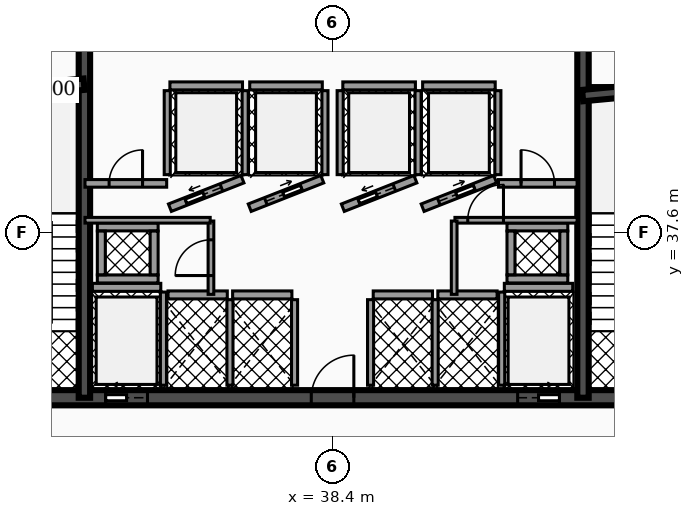
"""IFC4 building model, lengths in metres.
Left out: names, types, materials, properties, quantities, classifications, styles, units other than length and angle.
Written with IfcOpenShell. Run it as: python <this file> out.ifc"""

import sys

from ifc_helpers import new_model, si_unit, direction, frame, frame_2d, origin, place, context, subcontext, project, spatial, rectangle, extrude, element, fill, save


model = new_model("IFC4")
c1 = context("Model", 3, precision=1e-05, world=origin(), true_north=direction((0.0, 1.0)))
c2 = subcontext(c1, "Body", "Model", "MODEL_VIEW")
j1 = project(units=[si_unit("LENGTHUNIT", "METRE"), si_unit("PLANEANGLEUNIT", "RADIAN")], contexts=[c1])
p1 = place(None, origin())
s1 = spatial("IfcSite", under=j1, at=p1, CompositionType="ELEMENT")
p2 = place(p1, origin())
s2 = spatial("IfcBuilding", under=s1, at=p2, CompositionType="ELEMENT")
p3 = place(p2, frame((0.0, 0.0, 43.86)))
s3 = spatial("IfcBuildingStorey", under=s2, at=p3, CompositionType="ELEMENT", Elevation=43.86)
p4 = place(p3, frame((28.4, 33.25, 0.0), z_axis=(0.0, 0.0, 1.0), x_axis=(1.0, 0.0, 0.0)))
e1 = element("IfcWall", 1, at=p4, inside=s3, PredefinedType="SHEAR", context=c2, shape_type="SweptSolid", body=[
    extrude(rectangle(XDim=20.06, YDim=0.4, at=frame_2d((10.03, 0.0))), origin(), (0.0, 0.0, 1.0), 3.82),
])
p5 = place(p4, frame((4.03, 0.0, 0.0)))
e2 = element("IfcOpeningElement", 2, at=p5, cuts=e1, PredefinedType="OPENING", context=c2, shape_type="SweptSolid", body=[
    extrude(rectangle(XDim=1.1, YDim=2.15, at=frame_2d((0.55, 1.075))), frame((0.0, 0.21, 0.0), z_axis=(0.0, -1.0, 0.0), x_axis=(1.0, 0.0, 0.0)), (0.0, 0.0, 1.0), 0.42),
])
p6 = place(p4, frame((14.87, 0.0, 0.0)))
e3 = element("IfcOpeningElement", 3, at=p6, cuts=e1, PredefinedType="OPENING", context=c2, shape_type="SweptSolid", body=[
    extrude(rectangle(XDim=1.1, YDim=2.15, at=frame_2d((0.55, 1.075))), frame((0.0, 0.21, 0.0), z_axis=(0.0, -1.0, 0.0), x_axis=(1.0, 0.0, 0.0)), (0.0, 0.0, 1.0), 0.42),
])
p7 = place(p4, frame((1.31, 0.0, 0.0)))
e4 = element("IfcOpeningElement", 4, at=p7, cuts=e1, PredefinedType="OPENING", context=c2, shape_type="SweptSolid", body=[
    extrude(rectangle(XDim=1.1, YDim=2.2, at=frame_2d((0.55, 1.1))), frame((0.0, 0.21, 0.0), z_axis=(0.0, -1.0, 0.0), x_axis=(1.0, 0.0, 0.0)), (0.0, 0.0, 1.0), 0.42),
])
p8 = place(p4, frame((9.44, 0.0, 0.0)))
e5 = element("IfcOpeningElement", 5, at=p8, cuts=e1, PredefinedType="OPENING", context=c2, shape_type="SweptSolid", body=[
    extrude(rectangle(XDim=1.12, YDim=2.05, at=frame_2d((0.56, 1.025))), frame((0.0, 0.21, 0.0), z_axis=(0.0, -1.0, 0.0), x_axis=(1.0, 0.0, 0.0)), (0.0, 0.0, 1.0), 0.42),
])
p9 = place(p4, frame((17.65, 0.0, 0.0)))
e6 = element("IfcOpeningElement", 6, at=p9, cuts=e1, PredefinedType="OPENING", context=c2, shape_type="SweptSolid", body=[
    extrude(rectangle(XDim=1.1, YDim=2.2, at=frame_2d((0.55, 1.1))), frame((0.0, 0.21, 0.0), z_axis=(0.0, -1.0, 0.0), x_axis=(1.0, 0.0, 0.0)), (0.0, 0.0, 1.0), 0.42),
])
for number, where, z_axis, x_axis in (
    (7, (31.87, 33.25, 0.0), (0.0, 0.0, 1.0), (0.0, 1.0, 0.0)),
    (8, (44.99, 33.25, 0.0), (0.0, 0.0, 1.0), (0.0, 1.0, 0.0)),
):
    element("IfcWall", number, at=place(p3, frame(where, z_axis=z_axis, x_axis=x_axis)), inside=s3, PredefinedType="SHEAR", context=c2, shape_type="SweptSolid", body=[
        extrude(rectangle(XDim=10.2, YDim=0.3, at=frame_2d((5.1, 0.0))), origin(), (0.0, 0.0, 1.0), 3.82),
    ])
p10 = place(p3, frame((28.64, 41.2, 0.0), z_axis=(0.0, 0.0, 1.0), x_axis=(0.995687118776, 0.092774789157, 0.0)))
e9 = element("IfcWall", 9, at=p10, inside=s3, PredefinedType="SHEAR", context=c2, shape_type="SweptSolid", body=[
    extrude(rectangle(XDim=3.234, YDim=0.3, at=frame_2d((1.617, 0.0))), origin(), (0.0, 0.0, 1.0), 3.82),
])
p11 = place(p3, frame((44.98, 41.2, 0.0), z_axis=(0.0, 0.0, 1.0), x_axis=(0.995686468965, 0.09278176286, 0.0)))
e10 = element("IfcWall", 10, at=p11, inside=s3, PredefinedType="SHEAR", context=c2, shape_type="SweptSolid", body=[
    extrude(rectangle(XDim=3.234, YDim=0.3, at=frame_2d((1.617, 0.0))), origin(), (0.0, 0.0, 1.0), 3.82),
])
p12 = place(p3, frame((32.08, 36.155, 0.0), z_axis=(0.0, 0.0, 1.0), x_axis=(1.0, 0.0, 0.0)))
e11 = element("IfcWall", 11, at=p12, inside=s3, PredefinedType="SOLIDWALL", context=c2, shape_type="SweptSolid", body=[
    extrude(rectangle(XDim=1.8, YDim=0.21, at=frame_2d((0.9, 0.0))), origin(), (0.0, 0.0, 1.0), 2.792),
])
p13 = place(p3, frame((33.95, 33.58, 0.0), z_axis=(0.0, 0.0, 1.0), x_axis=(0.0, 1.0, 0.0)))
e12 = element("IfcWall", 12, at=p13, inside=s3, PredefinedType="SOLIDWALL", context=c2, shape_type="SweptSolid", body=[
    extrude(rectangle(XDim=2.45, YDim=0.16, at=frame_2d((1.225, 0.0))), origin(), (0.0, 0.0, 1.0), 2.792),
])
p14 = place(p3, frame((42.92, 36.155, 0.0), z_axis=(0.0, 0.0, 1.0), x_axis=(1.0, 0.0, 0.0)))
e13 = element("IfcWall", 13, at=p14, inside=s3, PredefinedType="SOLIDWALL", context=c2, shape_type="SweptSolid", body=[
    extrude(rectangle(XDim=1.8, YDim=0.21, at=frame_2d((0.9, 0.0))), origin(), (0.0, 0.0, 1.0), 2.792),
])
p15 = place(p3, frame((42.85, 33.58, 0.0), z_axis=(0.0, 0.0, 1.0), x_axis=(0.0, 1.0, 0.0)))
e14 = element("IfcWall", 14, at=p15, inside=s3, PredefinedType="SOLIDWALL", context=c2, shape_type="SweptSolid", body=[
    extrude(rectangle(XDim=2.45, YDim=0.16, at=frame_2d((1.225, 0.0))), origin(), (0.0, 0.0, 1.0), 2.792),
])
p16 = place(p3, frame((34.12, 38.25, 0.0), z_axis=(0.0, 0.0, 1.0), x_axis=(0.930804993012, 0.36551616241, 0.0)))
e15 = element("IfcWall", 15, at=p16, inside=s3, PredefinedType="SOLIDWALL", context=c2, shape_type="SweptSolid", body=[
    extrude(rectangle(XDim=2.052, YDim=0.21, at=frame_2d((1.026, 0.0))), origin(), (0.0, 0.0, 1.0), 2.792),
])
p17 = place(p16, frame((0.455, 0.0, 0.0)))
e16 = element("IfcOpeningElement", 16, at=p17, cuts=e15, PredefinedType="OPENING", context=c2, shape_type="SweptSolid", body=[
    extrude(rectangle(XDim=1.0, YDim=2.1, at=frame_2d((0.5, 1.05))), frame((0.0, 0.115, 0.0), z_axis=(0.0, -1.0, 0.0), x_axis=(1.0, 0.0, 0.0)), (0.0, 0.0, 1.0), 0.23),
])
p18 = place(p3, frame((34.12, 41.455, 0.0), z_axis=(0.0, 0.0, 1.0), x_axis=(1.0, 0.0, 0.0)))
e17 = element("IfcWall", 17, at=p18, inside=s3, PredefinedType="SOLIDWALL", context=c2, shape_type="SweptSolid", body=[
    extrude(rectangle(XDim=1.91, YDim=0.21, at=frame_2d((0.955, 0.0))), origin(), (0.0, 0.0, 1.0), 2.792),
])
for number, where, z_axis, x_axis in (
    (18, (34.05, 39.12, 0.0), (0.0, 0.0, 1.0), (0.0, 1.0, 0.0)),
    (19, (36.1, 39.12, 0.0), (0.0, 0.0, 1.0), (0.0, 1.0, 0.0)),
):
    element("IfcWall", number, at=place(p3, frame(where, z_axis=z_axis, x_axis=x_axis)), inside=s3, PredefinedType="SOLIDWALL", context=c2, shape_type="SweptSolid", body=[
        extrude(rectangle(XDim=2.21, YDim=0.16, at=frame_2d((1.105, 0.0))), origin(), (0.0, 0.0, 1.0), 2.792),
    ])
p19 = place(p3, frame((36.22, 38.25, 0.0), z_axis=(0.0, 0.0, 1.0), x_axis=(0.930804993012, 0.36551616241, 0.0)))
e20 = element("IfcWall", 20, at=p19, inside=s3, PredefinedType="SOLIDWALL", context=c2, shape_type="SweptSolid", body=[
    extrude(rectangle(XDim=2.052, YDim=0.21, at=frame_2d((1.026, 0.0))), origin(), (0.0, 0.0, 1.0), 2.792),
])
p20 = place(p19, frame((0.455, 0.0, 0.0)))
e21 = element("IfcOpeningElement", 21, at=p20, cuts=e20, PredefinedType="OPENING", context=c2, shape_type="SweptSolid", body=[
    extrude(rectangle(XDim=1.0, YDim=2.1, at=frame_2d((0.5, 1.05))), frame((0.0, 0.115, 0.0), z_axis=(0.0, -1.0, 0.0), x_axis=(1.0, 0.0, 0.0)), (0.0, 0.0, 1.0), 0.23),
])
p21 = place(p3, frame((36.22, 41.455, 0.0), z_axis=(0.0, 0.0, 1.0), x_axis=(1.0, 0.0, 0.0)))
e22 = element("IfcWall", 22, at=p21, inside=s3, PredefinedType="SOLIDWALL", context=c2, shape_type="SweptSolid", body=[
    extrude(rectangle(XDim=1.91, YDim=0.21, at=frame_2d((0.955, 0.0))), origin(), (0.0, 0.0, 1.0), 2.792),
])
p22 = place(p3, frame((38.2, 39.12, 0.0), z_axis=(0.0, 0.0, 1.0), x_axis=(0.0, 1.0, 0.0)))
e23 = element("IfcWall", 23, at=p22, inside=s3, PredefinedType="SOLIDWALL", context=c2, shape_type="SweptSolid", body=[
    extrude(rectangle(XDim=2.21, YDim=0.16, at=frame_2d((1.105, 0.0))), origin(), (0.0, 0.0, 1.0), 2.792),
])
p23 = place(p3, frame((38.67, 38.25, 0.0), z_axis=(0.0, 0.0, 1.0), x_axis=(0.930820886763, 0.3654756856, 0.0)))
e24 = element("IfcWall", 24, at=p23, inside=s3, PredefinedType="SOLIDWALL", context=c2, shape_type="SweptSolid", body=[
    extrude(rectangle(XDim=2.052, YDim=0.21, at=frame_2d((1.026, 0.0))), origin(), (0.0, 0.0, 1.0), 2.792),
])
p24 = place(p23, frame((0.455, 0.0, 0.0)))
e25 = element("IfcOpeningElement", 25, at=p24, cuts=e24, PredefinedType="OPENING", context=c2, shape_type="SweptSolid", body=[
    extrude(rectangle(XDim=1.0, YDim=2.1, at=frame_2d((0.5, 1.05))), frame((0.0, 0.115, 0.0), z_axis=(0.0, -1.0, 0.0), x_axis=(1.0, 0.0, 0.0)), (0.0, 0.0, 1.0), 0.23),
])
p25 = place(p3, frame((38.67, 41.455, 0.0), z_axis=(0.0, 0.0, 1.0), x_axis=(1.0, 0.0, 0.0)))
e26 = element("IfcWall", 26, at=p25, inside=s3, PredefinedType="SOLIDWALL", context=c2, shape_type="SweptSolid", body=[
    extrude(rectangle(XDim=1.91, YDim=0.21, at=frame_2d((0.955, 0.0))), origin(), (0.0, 0.0, 1.0), 2.792),
])
for number, where, z_axis, x_axis in (
    (27, (38.6, 39.12, 0.0), (0.0, 0.0, 1.0), (0.0, 1.0, 0.0)),
    (28, (40.65, 39.12, 0.0), (0.0, 0.0, 1.0), (0.0, 1.0, 0.0)),
):
    element("IfcWall", number, at=place(p3, frame(where, z_axis=z_axis, x_axis=x_axis)), inside=s3, PredefinedType="SOLIDWALL", context=c2, shape_type="SweptSolid", body=[
        extrude(rectangle(XDim=2.21, YDim=0.16, at=frame_2d((1.105, 0.0))), origin(), (0.0, 0.0, 1.0), 2.792),
    ])
p26 = place(p3, frame((40.77, 38.25, 0.0), z_axis=(0.0, 0.0, 1.0), x_axis=(0.930804993012, 0.36551616241, 0.0)))
e29 = element("IfcWall", 29, at=p26, inside=s3, PredefinedType="SOLIDWALL", context=c2, shape_type="SweptSolid", body=[
    extrude(rectangle(XDim=2.052, YDim=0.21, at=frame_2d((1.026, 0.0))), origin(), (0.0, 0.0, 1.0), 2.792),
])
p27 = place(p26, frame((0.455, 0.0, 0.0)))
e30 = element("IfcOpeningElement", 30, at=p27, cuts=e29, PredefinedType="OPENING", context=c2, shape_type="SweptSolid", body=[
    extrude(rectangle(XDim=1.0, YDim=2.1, at=frame_2d((0.5, 1.05))), frame((0.0, 0.115, 0.0), z_axis=(0.0, -1.0, 0.0), x_axis=(1.0, 0.0, 0.0)), (0.0, 0.0, 1.0), 0.23),
])
p28 = place(p3, frame((40.77, 41.455, 0.0), z_axis=(0.0, 0.0, 1.0), x_axis=(1.0, 0.0, 0.0)))
e31 = element("IfcWall", 31, at=p28, inside=s3, PredefinedType="SOLIDWALL", context=c2, shape_type="SweptSolid", body=[
    extrude(rectangle(XDim=1.91, YDim=0.21, at=frame_2d((0.955, 0.0))), origin(), (0.0, 0.0, 1.0), 2.792),
])
p29 = place(p3, frame((42.75, 39.12, 0.0), z_axis=(0.0, 0.0, 1.0), x_axis=(0.0, 1.0, 0.0)))
e32 = element("IfcWall", 32, at=p29, inside=s3, PredefinedType="SOLIDWALL", context=c2, shape_type="SweptSolid", body=[
    extrude(rectangle(XDim=2.21, YDim=0.16, at=frame_2d((1.105, 0.0))), origin(), (0.0, 0.0, 1.0), 2.792),
])
p30 = place(p3, frame((34.07, 35.955, 0.0), z_axis=(0.0, 0.0, 1.0), x_axis=(1.0, 0.0, 0.0)))
e33 = element("IfcWall", 33, at=p30, inside=s3, PredefinedType="SOLIDWALL", context=c2, shape_type="SweptSolid", body=[
    extrude(rectangle(XDim=1.56, YDim=0.21, at=frame_2d((0.78, 0.0))), origin(), (0.0, 0.0, 1.0), 2.792),
])
p31 = place(p3, frame((35.7, 33.58, 0.0), z_axis=(0.0, 0.0, 1.0), x_axis=(0.0, 1.0, 0.0)))
e34 = element("IfcWall", 34, at=p31, inside=s3, PredefinedType="SOLIDWALL", context=c2, shape_type="SweptSolid", body=[
    extrude(rectangle(XDim=2.25, YDim=0.16, at=frame_2d((1.125, 0.0))), origin(), (0.0, 0.0, 1.0), 2.792),
])
p32 = place(p3, frame((35.77, 35.955, 0.0), z_axis=(0.0, 0.0, 1.0), x_axis=(1.0, 0.0, 0.0)))
e35 = element("IfcWall", 35, at=p32, inside=s3, PredefinedType="SOLIDWALL", context=c2, shape_type="SweptSolid", body=[
    extrude(rectangle(XDim=1.56, YDim=0.21, at=frame_2d((0.78, 0.0))), origin(), (0.0, 0.0, 1.0), 2.792),
])
p33 = place(p3, frame((37.4, 33.58, 0.0), z_axis=(0.0, 0.0, 1.0), x_axis=(0.0, 1.0, 0.0)))
e36 = element("IfcWall", 36, at=p33, inside=s3, PredefinedType="SOLIDWALL", context=c2, shape_type="SweptSolid", body=[
    extrude(rectangle(XDim=2.25, YDim=0.16, at=frame_2d((1.125, 0.0))), origin(), (0.0, 0.0, 1.0), 2.792),
])
p34 = place(p3, frame((39.47, 35.955, 0.0), z_axis=(0.0, 0.0, 1.0), x_axis=(1.0, 0.0, 0.0)))
e37 = element("IfcWall", 37, at=p34, inside=s3, PredefinedType="SOLIDWALL", context=c2, shape_type="SweptSolid", body=[
    extrude(rectangle(XDim=1.56, YDim=0.21, at=frame_2d((0.78, 0.0))), origin(), (0.0, 0.0, 1.0), 2.792),
])
for number, where, z_axis, x_axis in (
    (38, (39.4, 33.58, 0.0), (0.0, 0.0, 1.0), (0.0, 1.0, 0.0)),
    (39, (41.1, 33.58, 0.0), (0.0, 0.0, 1.0), (0.0, 1.0, 0.0)),
):
    element("IfcWall", number, at=place(p3, frame(where, z_axis=z_axis, x_axis=x_axis)), inside=s3, PredefinedType="SOLIDWALL", context=c2, shape_type="SweptSolid", body=[
        extrude(rectangle(XDim=2.25, YDim=0.16, at=frame_2d((1.125, 0.0))), origin(), (0.0, 0.0, 1.0), 2.792),
    ])
p35 = place(p3, frame((41.17, 35.955, 0.0), z_axis=(0.0, 0.0, 1.0), x_axis=(1.0, 0.0, 0.0)))
e40 = element("IfcWall", 40, at=p35, inside=s3, PredefinedType="SOLIDWALL", context=c2, shape_type="SweptSolid", body=[
    extrude(rectangle(XDim=1.56, YDim=0.21, at=frame_2d((0.78, 0.0))), origin(), (0.0, 0.0, 1.0), 2.792),
])
for number, where, z_axis, x_axis in (
    (41, (32.21, 36.375, 0.0), (0.0, 0.0, 1.0), (1.0, 0.0, 0.0)),
    (42, (32.21, 37.745, 0.0), (0.0, 0.0, 1.0), (1.0, 0.0, 0.0)),
):
    element("IfcWall", number, at=place(p3, frame(where, z_axis=z_axis, x_axis=x_axis)), inside=s3, PredefinedType="SOLIDWALL", context=c2, shape_type="SweptSolid", body=[
        extrude(rectangle(XDim=1.6, YDim=0.21, at=frame_2d((0.8, 0.0))), origin(), (0.0, 0.0, 1.0), 3.82),
    ])
for number, where, z_axis, x_axis in (
    (43, (32.315, 36.485, 0.0), (0.0, 0.0, 1.0), (0.0, 1.0, 0.0)),
    (44, (33.705, 36.485, 0.0), (0.0, 0.0, 1.0), (0.0, 1.0, 0.0)),
):
    element("IfcWall", number, at=place(p3, frame(where, z_axis=z_axis, x_axis=x_axis)), inside=s3, PredefinedType="SOLIDWALL", context=c2, shape_type="SweptSolid", body=[
        extrude(rectangle(XDim=1.15, YDim=0.21, at=frame_2d((0.575, 0.0))), origin(), (0.0, 0.0, 1.0), 3.82),
    ])
for number, where, z_axis, x_axis in (
    (45, (42.99, 36.375, 0.0), (0.0, 0.0, 1.0), (1.0, 0.0, 0.0)),
    (46, (42.99, 37.745, 0.0), (0.0, 0.0, 1.0), (1.0, 0.0, 0.0)),
):
    element("IfcWall", number, at=place(p3, frame(where, z_axis=z_axis, x_axis=x_axis)), inside=s3, PredefinedType="SOLIDWALL", context=c2, shape_type="SweptSolid", body=[
        extrude(rectangle(XDim=1.6, YDim=0.21, at=frame_2d((0.8, 0.0))), origin(), (0.0, 0.0, 1.0), 3.82),
    ])
for number, where, z_axis, x_axis in (
    (47, (43.095, 36.485, 0.0), (0.0, 0.0, 1.0), (0.0, 1.0, 0.0)),
    (48, (44.485, 36.485, 0.0), (0.0, 0.0, 1.0), (0.0, 1.0, 0.0)),
):
    element("IfcWall", number, at=place(p3, frame(where, z_axis=z_axis, x_axis=x_axis)), inside=s3, PredefinedType="SOLIDWALL", context=c2, shape_type="SweptSolid", body=[
        extrude(rectangle(XDim=1.15, YDim=0.21, at=frame_2d((0.575, 0.0))), origin(), (0.0, 0.0, 1.0), 3.82),
    ])
p36 = place(p3, frame((35.2, 35.97, 0.0), z_axis=(0.0, 0.0, 1.0), x_axis=(0.0, 1.0, 0.0)))
e49 = element("IfcWall", 49, at=p36, inside=s3, PredefinedType="PARTITIONING", context=c2, shape_type="SweptSolid", body=[
    extrude(rectangle(XDim=1.93, YDim=0.15, at=frame_2d((0.965, 0.0))), origin(), (0.0, 0.0, 1.0), 2.777),
])
p37 = place(p36, frame((0.495, 0.0, 0.0)))
e50 = element("IfcOpeningElement", 50, at=p37, cuts=e49, PredefinedType="OPENING", context=c2, shape_type="SweptSolid", body=[
    extrude(rectangle(XDim=0.94, YDim=2.05, at=frame_2d((0.47, 1.025))), frame((0.0, 0.085, 0.0), z_axis=(0.0, -1.0, 0.0), x_axis=(1.0, 0.0, 0.0)), (0.0, 0.0, 1.0), 0.17),
])
p38 = place(p3, frame((31.885, 37.92, 0.0), z_axis=(0.0, 0.0, 1.0), x_axis=(1.0, 0.0, 0.0)))
e51 = element("IfcWall", 51, at=p38, inside=s3, PredefinedType="PARTITIONING", context=c2, shape_type="SweptSolid", body=[
    extrude(rectangle(XDim=3.295, YDim=0.15, at=frame_2d((1.647, 0.0))), origin(), (0.0, 0.0, 1.0), 2.777),
])
p39 = place(p3, frame((31.885, 38.89, 0.0), z_axis=(0.0, 0.0, 1.0), x_axis=(1.0, 0.0, 0.0)))
e52 = element("IfcWall", 52, at=p39, inside=s3, PredefinedType="PARTITIONING", context=c2, shape_type="SweptSolid", body=[
    extrude(rectangle(XDim=2.15, YDim=0.2, at=frame_2d((1.075, 0.0))), origin(), (0.0, 0.0, 1.0), 2.777),
])
p40 = place(p39, frame((0.635, 0.0, 0.0)))
e53 = element("IfcOpeningElement", 53, at=p40, cuts=e52, PredefinedType="OPENING", context=c2, shape_type="SweptSolid", body=[
    extrude(rectangle(XDim=0.88, YDim=2.05, at=frame_2d((0.44, 1.025))), frame((0.0, 0.11, 0.0), z_axis=(0.0, -1.0, 0.0), x_axis=(1.0, 0.0, 0.0)), (0.0, 0.0, 1.0), 0.22),
])
p41 = place(p3, frame((42.765, 38.89, 0.0), z_axis=(0.0, 0.0, 1.0), x_axis=(1.0, 0.0, 0.0)))
e54 = element("IfcWall", 54, at=p41, inside=s3, PredefinedType="PARTITIONING", context=c2, shape_type="SweptSolid", body=[
    extrude(rectangle(XDim=2.07, YDim=0.2, at=frame_2d((1.035, 0.0))), origin(), (0.0, 0.0, 1.0), 2.777),
])
p42 = place(p41, frame((0.595, 0.0, 0.0)))
e55 = element("IfcOpeningElement", 55, at=p42, cuts=e54, PredefinedType="OPENING", context=c2, shape_type="SweptSolid", body=[
    extrude(rectangle(XDim=0.88, YDim=2.05, at=frame_2d((0.44, 1.025))), frame((0.0, 0.11, 0.0), z_axis=(0.0, -1.0, 0.0), x_axis=(1.0, 0.0, 0.0)), (0.0, 0.0, 1.0), 0.22),
])
p43 = place(p3, frame((41.62, 37.92, 0.0), z_axis=(0.0, 0.0, 1.0), x_axis=(1.0, 0.0, 0.0)))
e56 = element("IfcWall", 56, at=p43, inside=s3, PredefinedType="PARTITIONING", context=c2, shape_type="SweptSolid", body=[
    extrude(rectangle(XDim=3.215, YDim=0.15, at=frame_2d((1.607, 0.0))), origin(), (0.0, 0.0, 1.0), 2.777),
])
p44 = place(p43, frame((0.337, 0.0, 0.0)))
e57 = element("IfcOpeningElement", 57, at=p44, cuts=e56, PredefinedType="OPENING", context=c2, shape_type="SweptSolid", body=[
    extrude(rectangle(XDim=0.94, YDim=2.05, at=frame_2d((0.47, 1.025))), frame((0.0, 0.085, 0.0), z_axis=(0.0, -1.0, 0.0), x_axis=(1.0, 0.0, 0.0)), (0.0, 0.0, 1.0), 0.17),
])
p45 = place(p3, frame((41.6, 35.97, 0.0), z_axis=(0.0, 0.0, 1.0), x_axis=(0.0, 1.0, 0.0)))
e58 = element("IfcWall", 58, at=p45, inside=s3, PredefinedType="PARTITIONING", context=c2, shape_type="SweptSolid", body=[
    extrude(rectangle(XDim=1.93, YDim=0.15, at=frame_2d((0.965, 0.0))), origin(), (0.0, 0.0, 1.0), 2.777),
])
p46 = place(p5, origin())
e59 = element("IfcDoor", 59, at=p46, inside=s3, OperationType="SLIDING_TO_LEFT", PredefinedType="DOOR", context=c2, shape_type="SweptSolid", body=[
    extrude(rectangle(XDim=1.1, YDim=2.15, at=frame_2d((0.55, 1.075))), frame((0.0, 0.025, 0.0), z_axis=(0.0, -1.0, 0.0), x_axis=(1.0, 0.0, 0.0)), (0.0, 0.0, 1.0), 0.05),
])
fill(e2, e59)
p47 = place(p6, origin())
e60 = element("IfcDoor", 60, at=p47, inside=s3, OperationType="SLIDING_TO_RIGHT", PredefinedType="DOOR", context=c2, shape_type="SweptSolid", body=[
    extrude(rectangle(XDim=1.1, YDim=2.15, at=frame_2d((0.55, 1.075))), frame((0.0, 0.025, 0.0), z_axis=(0.0, -1.0, 0.0), x_axis=(1.0, 0.0, 0.0)), (0.0, 0.0, 1.0), 0.05),
])
fill(e3, e60)
p48 = place(p17, origin())
e61 = element("IfcDoor", 61, at=p48, inside=s3, OperationType="SLIDING_TO_LEFT", PredefinedType="DOOR", context=c2, shape_type="SweptSolid", body=[
    extrude(rectangle(XDim=1.0, YDim=2.1, at=frame_2d((0.5, 1.05))), frame((0.0, 0.025, 0.0), z_axis=(0.0, -1.0, 0.0), x_axis=(1.0, 0.0, 0.0)), (0.0, 0.0, 1.0), 0.05),
])
fill(e16, e61)
p49 = place(p20, origin())
e62 = element("IfcDoor", 62, at=p49, inside=s3, OperationType="SLIDING_TO_RIGHT", PredefinedType="DOOR", context=c2, shape_type="SweptSolid", body=[
    extrude(rectangle(XDim=1.0, YDim=2.1, at=frame_2d((0.5, 1.05))), frame((0.0, 0.025, 0.0), z_axis=(0.0, -1.0, 0.0), x_axis=(1.0, 0.0, 0.0)), (0.0, 0.0, 1.0), 0.05),
])
fill(e21, e62)
p50 = place(p24, origin())
e63 = element("IfcDoor", 63, at=p50, inside=s3, OperationType="SLIDING_TO_LEFT", PredefinedType="DOOR", context=c2, shape_type="SweptSolid", body=[
    extrude(rectangle(XDim=1.0, YDim=2.1, at=frame_2d((0.5, 1.05))), frame((0.0, 0.025, 0.0), z_axis=(0.0, -1.0, 0.0), x_axis=(1.0, 0.0, 0.0)), (0.0, 0.0, 1.0), 0.05),
])
fill(e25, e63)
p51 = place(p27, origin())
e64 = element("IfcDoor", 64, at=p51, inside=s3, OperationType="SLIDING_TO_RIGHT", PredefinedType="DOOR", context=c2, shape_type="SweptSolid", body=[
    extrude(rectangle(XDim=1.0, YDim=2.1, at=frame_2d((0.5, 1.05))), frame((0.0, 0.025, 0.0), z_axis=(0.0, -1.0, 0.0), x_axis=(1.0, 0.0, 0.0)), (0.0, 0.0, 1.0), 0.05),
])
fill(e30, e64)
p52 = place(p8, origin())
e65 = element("IfcDoor", 65, at=p52, inside=s3, OperationType="SINGLE_SWING_RIGHT", PredefinedType="DOOR", context=c2, shape_type="SweptSolid", body=[
    extrude(rectangle(XDim=1.12, YDim=2.05, at=frame_2d((0.56, 1.025))), frame((0.0, 0.025, 0.0), z_axis=(0.0, -1.0, 0.0), x_axis=(1.0, 0.0, 0.0)), (0.0, 0.0, 1.0), 0.05),
])
fill(e5, e65)
p53 = place(p37, origin())
e66 = element("IfcDoor", 66, at=p53, inside=s3, OperationType="SINGLE_SWING_LEFT", PredefinedType="DOOR", context=c2, shape_type="SweptSolid", body=[
    extrude(rectangle(XDim=0.94, YDim=2.05, at=frame_2d((0.47, 1.025))), frame((0.0, 0.025, 0.0), z_axis=(0.0, -1.0, 0.0), x_axis=(1.0, 0.0, 0.0)), (0.0, 0.0, 1.0), 0.05),
])
fill(e50, e66)
p54 = place(p40, origin())
e67 = element("IfcDoor", 67, at=p54, inside=s3, OperationType="SINGLE_SWING_RIGHT", PredefinedType="DOOR", context=c2, shape_type="SweptSolid", body=[
    extrude(rectangle(XDim=0.88, YDim=2.05, at=frame_2d((0.44, 1.025))), frame((0.0, 0.025, 0.0), z_axis=(0.0, -1.0, 0.0), x_axis=(1.0, 0.0, 0.0)), (0.0, 0.0, 1.0), 0.05),
])
fill(e53, e67)
p55 = place(p42, origin())
e68 = element("IfcDoor", 68, at=p55, inside=s3, OperationType="SINGLE_SWING_LEFT", PredefinedType="DOOR", context=c2, shape_type="SweptSolid", body=[
    extrude(rectangle(XDim=0.88, YDim=2.05, at=frame_2d((0.44, 1.025))), frame((0.0, 0.025, 0.0), z_axis=(0.0, -1.0, 0.0), x_axis=(1.0, 0.0, 0.0)), (0.0, 0.0, 1.0), 0.05),
])
fill(e55, e68)
p56 = place(p44, origin())
e69 = element("IfcDoor", 69, at=p56, inside=s3, OperationType="SINGLE_SWING_RIGHT", PredefinedType="DOOR", context=c2, shape_type="SweptSolid", body=[
    extrude(rectangle(XDim=0.94, YDim=2.05, at=frame_2d((0.47, 1.025))), frame((0.0, 0.025, 0.0), z_axis=(0.0, -1.0, 0.0), x_axis=(1.0, 0.0, 0.0)), (0.0, 0.0, 1.0), 0.05),
])
fill(e57, e69)
save(model, sys.argv[1])
